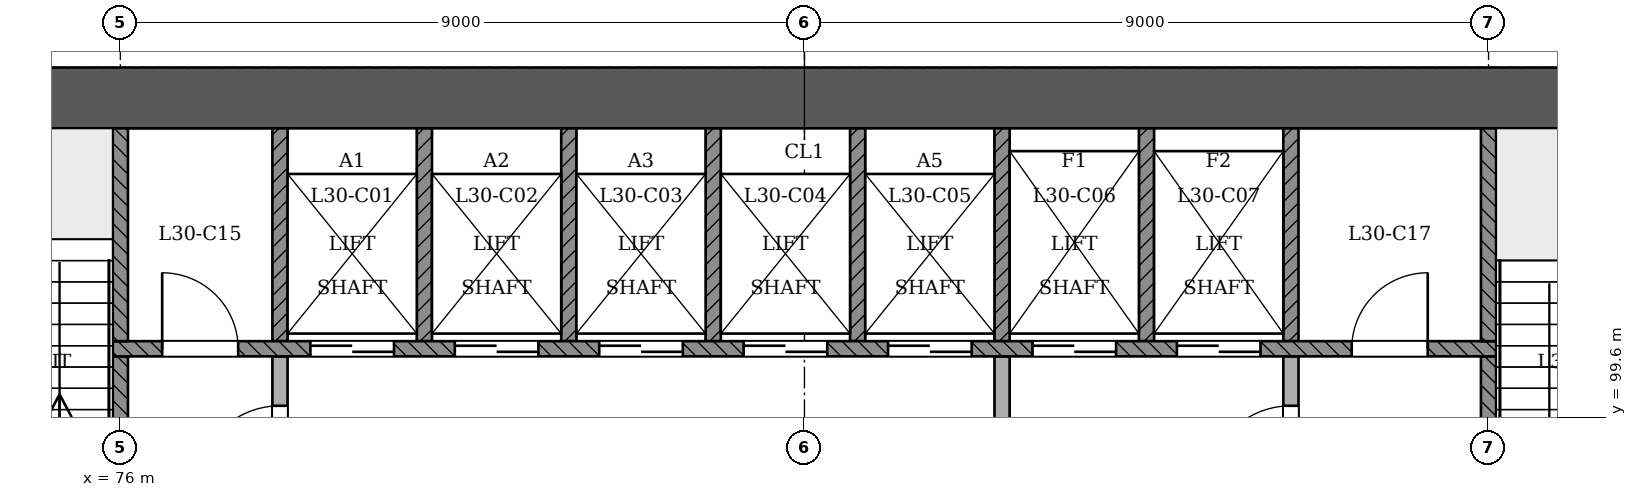
"""IFC4 building model, lengths in metres.
Left out: names, types, materials, properties, quantities, classifications, styles, units other than length and angle.
Written with IfcOpenShell. Run it as: python <this file> out.ifc"""

import sys

from ifc_helpers import new_model, si_unit, direction, frame, frame_2d, origin, place, context, subcontext, project, spatial, rectangle, extrude, element, fill, save


model = new_model("IFC4")
c1 = context("Model", 3, precision=1e-05, world=origin(), true_north=direction((0.0, 1.0)))
c2 = subcontext(c1, "Body", "Model", "MODEL_VIEW")
j1 = project(units=[si_unit("LENGTHUNIT", "METRE"), si_unit("PLANEANGLEUNIT", "RADIAN")], contexts=[c1])
p1 = place(None, origin())
s1 = spatial("IfcSite", under=j1, at=p1, CompositionType="ELEMENT")
p2 = place(p1, origin())
s2 = spatial("IfcBuilding", under=s1, at=p2, CompositionType="ELEMENT")
p3 = place(p2, frame((0.0, 0.0, 118.8)))
s3 = spatial("IfcBuildingStorey", under=s2, at=p3, CompositionType="ELEMENT", Elevation=118.8)
p4 = place(p3, frame((97.4, 103.8, 0.0), z_axis=(0.0, 0.0, 1.0), x_axis=(-1.0, 0.0, 0.0)))
e1 = element("IfcWall", 1, at=p4, inside=s3, PredefinedType="SHEAR", context=c2, shape_type="SweptSolid", body=[
    extrude(rectangle(XDim=25.2, YDim=0.8, at=frame_2d((12.6, 0.0))), origin(), (0.0, 0.0, 1.0), 5.4),
])
p5 = place(p3, frame((87.6, 93.4, 0.0), z_axis=(0.0, 0.0, 1.0), x_axis=(0.0, 1.0, 0.0)))
e2 = element("IfcWall", 2, at=p5, inside=s3, PredefinedType="PARTITIONING", context=c2, shape_type="SweptSolid", body=[
    extrude(rectangle(XDim=7.0, YDim=0.2, at=frame_2d((3.5, 0.0))), origin(), (0.0, 0.0, 1.0), 4.95),
])
p6 = place(p5, frame((4.45, 0.0, 0.0)))
e3 = element("IfcOpeningElement", 3, at=p6, cuts=e2, PredefinedType="OPENING", context=c2, shape_type="SweptSolid", body=[
    extrude(rectangle(XDim=1.1, YDim=2.1, at=frame_2d((0.55, 1.05))), frame((0.0, 0.11, 0.0), z_axis=(0.0, -1.0, 0.0), x_axis=(1.0, 0.0, 0.0)), (0.0, 0.0, 1.0), 0.221),
])
p7 = place(p3, frame((91.4, 96.2, 0.0), z_axis=(0.0, 0.0, 1.0), x_axis=(0.0, 1.0, 0.0)))
e4 = element("IfcWall", 4, at=p7, inside=s3, PredefinedType="PARTITIONING", context=c2, shape_type="SweptSolid", body=[
    extrude(rectangle(XDim=4.2, YDim=0.2, at=frame_2d((2.1, 0.0))), origin(), (0.0, 0.0, 1.0), 4.95),
])
p8 = place(p7, frame((2.45, 0.0, 0.0)))
e5 = element("IfcOpeningElement", 5, at=p8, cuts=e4, PredefinedType="OPENING", context=c2, shape_type="SweptSolid", body=[
    extrude(rectangle(XDim=1.1, YDim=2.1, at=frame_2d((0.55, 1.05))), frame((0.0, 0.11, 0.0), z_axis=(0.0, -1.0, 0.0), x_axis=(1.0, 0.0, 0.0)), (0.0, 0.0, 1.0), 0.221),
])
p9 = place(p3, frame((76.0, 96.7, 0.0), z_axis=(0.0, 0.0, 1.0), x_axis=(0.0, 1.0, 0.0)))
e6 = element("IfcWall", 6, at=p9, inside=s3, PredefinedType="SOLIDWALL", context=c2, shape_type="SweptSolid", body=[
    extrude(rectangle(XDim=3.7, YDim=0.2, at=frame_2d((1.85, 0.0))), origin(), (0.0, 0.0, 1.0), 4.95),
])
p10 = place(p9, frame((0.35, 0.0, 0.0)))
e7 = element("IfcOpeningElement", 7, at=p10, cuts=e6, PredefinedType="OPENING", context=c2, shape_type="SweptSolid", body=[
    extrude(rectangle(XDim=1.1, YDim=2.1, at=frame_2d((0.55, 1.05))), frame((0.0, 0.11, 0.0), z_axis=(0.0, -1.0, 0.0), x_axis=(1.0, 0.0, 0.0)), (0.0, 0.0, 1.0), 0.221),
])
p11 = place(p3, frame((78.1, 96.7, 0.0), z_axis=(0.0, 0.0, 1.0), x_axis=(0.0, 1.0, 0.0)))
e8 = element("IfcWall", 8, at=p11, inside=s3, PredefinedType="PARTITIONING", context=c2, shape_type="SweptSolid", body=[
    extrude(rectangle(XDim=3.7, YDim=0.2, at=frame_2d((1.85, 0.0))), origin(), (0.0, 0.0, 1.0), 4.95),
])
p12 = place(p11, frame((1.95, 0.0, 0.0)))
e9 = element("IfcOpeningElement", 9, at=p12, cuts=e8, PredefinedType="OPENING", context=c2, shape_type="SweptSolid", body=[
    extrude(rectangle(XDim=1.1, YDim=2.1, at=frame_2d((0.55, 1.05))), frame((0.0, 0.11, 0.0), z_axis=(0.0, -1.0, 0.0), x_axis=(1.0, 0.0, 0.0)), (0.0, 0.0, 1.0), 0.221),
])
p13 = place(p3, frame((94.0, 96.7, 0.0), z_axis=(0.0, 0.0, 1.0), x_axis=(0.0, 1.0, 0.0)))
e10 = element("IfcWall", 10, at=p13, inside=s3, PredefinedType="SOLIDWALL", context=c2, shape_type="SweptSolid", body=[
    extrude(rectangle(XDim=3.7, YDim=0.2, at=frame_2d((1.85, 0.0))), origin(), (0.0, 0.0, 1.0), 4.95),
])
p14 = place(p13, frame((0.35, 0.0, 0.0)))
e11 = element("IfcOpeningElement", 11, at=p14, cuts=e10, PredefinedType="OPENING", context=c2, shape_type="SweptSolid", body=[
    extrude(rectangle(XDim=1.1, YDim=2.1, at=frame_2d((0.55, 1.05))), frame((0.0, 0.11, 0.0), z_axis=(0.0, -1.0, 0.0), x_axis=(1.0, 0.0, 0.0)), (0.0, 0.0, 1.0), 0.221),
])
p15 = place(p3, frame((75.9, 100.5, 0.0), z_axis=(0.0, 0.0, 1.0), x_axis=(1.0, 0.0, 0.0)))
e12 = element("IfcWall", 12, at=p15, inside=s3, PredefinedType="SOLIDWALL", context=c2, shape_type="SweptSolid", body=[
    extrude(rectangle(XDim=18.2, YDim=0.2, at=frame_2d((9.1, 0.0))), origin(), (0.0, 0.0, 1.0), 4.95),
])
p16 = place(p15, frame((2.6, 0.0, 0.0)))
e13 = element("IfcOpeningElement", 13, at=p16, cuts=e12, PredefinedType="OPENING", context=c2, shape_type="SweptSolid", body=[
    extrude(rectangle(XDim=1.1, YDim=2.1, at=frame_2d((0.55, 1.05))), frame((0.0, 0.11, 0.0), z_axis=(0.0, -1.0, 0.0), x_axis=(1.0, 0.0, 0.0)), (0.0, 0.0, 1.0), 0.221),
])
p17 = place(p15, frame((4.5, 0.0, 0.0)))
e14 = element("IfcOpeningElement", 14, at=p17, cuts=e12, PredefinedType="OPENING", context=c2, shape_type="SweptSolid", body=[
    extrude(rectangle(XDim=1.1, YDim=2.1, at=frame_2d((0.55, 1.05))), frame((0.0, 0.11, 0.0), z_axis=(0.0, -1.0, 0.0), x_axis=(1.0, 0.0, 0.0)), (0.0, 0.0, 1.0), 0.221),
])
p18 = place(p15, frame((6.4, 0.0, 0.0)))
e15 = element("IfcOpeningElement", 15, at=p18, cuts=e12, PredefinedType="OPENING", context=c2, shape_type="SweptSolid", body=[
    extrude(rectangle(XDim=1.1, YDim=2.1, at=frame_2d((0.55, 1.05))), frame((0.0, 0.11, 0.0), z_axis=(0.0, -1.0, 0.0), x_axis=(1.0, 0.0, 0.0)), (0.0, 0.0, 1.0), 0.221),
])
p19 = place(p15, frame((8.3, 0.0, 0.0)))
e16 = element("IfcOpeningElement", 16, at=p19, cuts=e12, PredefinedType="OPENING", context=c2, shape_type="SweptSolid", body=[
    extrude(rectangle(XDim=1.1, YDim=2.1, at=frame_2d((0.55, 1.05))), frame((0.0, 0.11, 0.0), z_axis=(0.0, -1.0, 0.0), x_axis=(1.0, 0.0, 0.0)), (0.0, 0.0, 1.0), 0.221),
])
p20 = place(p15, frame((10.2, 0.0, 0.0)))
e17 = element("IfcOpeningElement", 17, at=p20, cuts=e12, PredefinedType="OPENING", context=c2, shape_type="SweptSolid", body=[
    extrude(rectangle(XDim=1.1, YDim=2.1, at=frame_2d((0.55, 1.05))), frame((0.0, 0.11, 0.0), z_axis=(0.0, -1.0, 0.0), x_axis=(1.0, 0.0, 0.0)), (0.0, 0.0, 1.0), 0.221),
])
p21 = place(p15, frame((12.1, 0.0, 0.0)))
e18 = element("IfcOpeningElement", 18, at=p21, cuts=e12, PredefinedType="OPENING", context=c2, shape_type="SweptSolid", body=[
    extrude(rectangle(XDim=1.1, YDim=2.1, at=frame_2d((0.55, 1.05))), frame((0.0, 0.11, 0.0), z_axis=(0.0, -1.0, 0.0), x_axis=(1.0, 0.0, 0.0)), (0.0, 0.0, 1.0), 0.221),
])
p22 = place(p15, frame((14.0, 0.0, 0.0)))
e19 = element("IfcOpeningElement", 19, at=p22, cuts=e12, PredefinedType="OPENING", context=c2, shape_type="SweptSolid", body=[
    extrude(rectangle(XDim=1.1, YDim=2.1, at=frame_2d((0.55, 1.05))), frame((0.0, 0.11, 0.0), z_axis=(0.0, -1.0, 0.0), x_axis=(1.0, 0.0, 0.0)), (0.0, 0.0, 1.0), 0.221),
])
p23 = place(p15, frame((0.65, 0.0, 0.0)))
e20 = element("IfcOpeningElement", 20, at=p23, cuts=e12, PredefinedType="OPENING", context=c2, shape_type="SweptSolid", body=[
    extrude(rectangle(XDim=1.0, YDim=2.1, at=frame_2d((0.5, 1.05))), frame((0.0, 0.11, 0.0), z_axis=(0.0, -1.0, 0.0), x_axis=(1.0, 0.0, 0.0)), (0.0, 0.0, 1.0), 0.221),
])
p24 = place(p15, frame((16.3, 0.0, 0.0)))
e21 = element("IfcOpeningElement", 21, at=p24, cuts=e12, PredefinedType="OPENING", context=c2, shape_type="SweptSolid", body=[
    extrude(rectangle(XDim=1.0, YDim=2.1, at=frame_2d((0.5, 1.05))), frame((0.0, 0.11, 0.0), z_axis=(0.0, -1.0, 0.0), x_axis=(1.0, 0.0, 0.0)), (0.0, 0.0, 1.0), 0.221),
])
for number, where, z_axis, x_axis in (
    (22, (76.0, 100.6, 0.0), (0.0, 0.0, 1.0), (0.0, 1.0, 0.0)),
    (23, (78.1, 100.6, 0.0), (0.0, 0.0, 1.0), (0.0, 1.0, 0.0)),
    (24, (80.0, 100.6, 0.0), (0.0, 0.0, 1.0), (0.0, 1.0, 0.0)),
    (25, (81.9, 100.6, 0.0), (0.0, 0.0, 1.0), (0.0, 1.0, 0.0)),
    (26, (83.8, 100.6, 0.0), (0.0, 0.0, 1.0), (0.0, 1.0, 0.0)),
    (27, (85.7, 100.6, 0.0), (0.0, 0.0, 1.0), (0.0, 1.0, 0.0)),
    (28, (87.6, 100.6, 0.0), (0.0, 0.0, 1.0), (0.0, 1.0, 0.0)),
    (29, (89.5, 100.6, 0.0), (0.0, 0.0, 1.0), (0.0, 1.0, 0.0)),
    (30, (91.4, 100.6, 0.0), (0.0, 0.0, 1.0), (0.0, 1.0, 0.0)),
    (31, (94.0, 100.6, 0.0), (0.0, 0.0, 1.0), (0.0, 1.0, 0.0)),
):
    element("IfcWall", number, at=place(p3, frame(where, z_axis=z_axis, x_axis=x_axis)), inside=s3, PredefinedType="SOLIDWALL", context=c2, shape_type="SweptSolid", body=[
        extrude(rectangle(XDim=2.8, YDim=0.2, at=frame_2d((1.4, 0.0))), origin(), (0.0, 0.0, 1.0), 4.95),
    ])
p25 = place(p16, origin())
e32 = element("IfcDoor", 32, at=p25, inside=s3, OperationType="SLIDING_TO_RIGHT", PredefinedType="NOTDEFINED", context=c2, shape_type="SweptSolid", body=[
    extrude(rectangle(XDim=1.1, YDim=2.1, at=frame_2d((0.55, 1.05))), frame((0.0, 0.025, 0.0), z_axis=(0.0, -1.0, 0.0), x_axis=(1.0, 0.0, 0.0)), (0.0, 0.0, 1.0), 0.05),
])
fill(e13, e32)
p26 = place(p17, origin())
e33 = element("IfcDoor", 33, at=p26, inside=s3, OperationType="SLIDING_TO_LEFT", PredefinedType="NOTDEFINED", context=c2, shape_type="SweptSolid", body=[
    extrude(rectangle(XDim=1.1, YDim=2.1, at=frame_2d((0.55, 1.05))), frame((0.0, 0.025, 0.0), z_axis=(0.0, -1.0, 0.0), x_axis=(1.0, 0.0, 0.0)), (0.0, 0.0, 1.0), 0.05),
])
fill(e14, e33)
p27 = place(p18, origin())
e34 = element("IfcDoor", 34, at=p27, inside=s3, OperationType="SLIDING_TO_RIGHT", PredefinedType="NOTDEFINED", context=c2, shape_type="SweptSolid", body=[
    extrude(rectangle(XDim=1.1, YDim=2.1, at=frame_2d((0.55, 1.05))), frame((0.0, 0.025, 0.0), z_axis=(0.0, -1.0, 0.0), x_axis=(1.0, 0.0, 0.0)), (0.0, 0.0, 1.0), 0.05),
])
fill(e15, e34)
p28 = place(p19, origin())
e35 = element("IfcDoor", 35, at=p28, inside=s3, OperationType="SLIDING_TO_LEFT", PredefinedType="NOTDEFINED", context=c2, shape_type="SweptSolid", body=[
    extrude(rectangle(XDim=1.1, YDim=2.1, at=frame_2d((0.55, 1.05))), frame((0.0, 0.025, 0.0), z_axis=(0.0, -1.0, 0.0), x_axis=(1.0, 0.0, 0.0)), (0.0, 0.0, 1.0), 0.05),
])
fill(e16, e35)
p29 = place(p20, origin())
e36 = element("IfcDoor", 36, at=p29, inside=s3, OperationType="SLIDING_TO_RIGHT", PredefinedType="NOTDEFINED", context=c2, shape_type="SweptSolid", body=[
    extrude(rectangle(XDim=1.1, YDim=2.1, at=frame_2d((0.55, 1.05))), frame((0.0, 0.025, 0.0), z_axis=(0.0, -1.0, 0.0), x_axis=(1.0, 0.0, 0.0)), (0.0, 0.0, 1.0), 0.05),
])
fill(e17, e36)
p30 = place(p21, origin())
e37 = element("IfcDoor", 37, at=p30, inside=s3, OperationType="SLIDING_TO_RIGHT", PredefinedType="NOTDEFINED", context=c2, shape_type="SweptSolid", body=[
    extrude(rectangle(XDim=1.1, YDim=2.1, at=frame_2d((0.55, 1.05))), frame((0.0, 0.025, 0.0), z_axis=(0.0, -1.0, 0.0), x_axis=(1.0, 0.0, 0.0)), (0.0, 0.0, 1.0), 0.05),
])
fill(e18, e37)
p31 = place(p22, origin())
e38 = element("IfcDoor", 38, at=p31, inside=s3, OperationType="SLIDING_TO_LEFT", PredefinedType="NOTDEFINED", context=c2, shape_type="SweptSolid", body=[
    extrude(rectangle(XDim=1.1, YDim=2.1, at=frame_2d((0.55, 1.05))), frame((0.0, 0.025, 0.0), z_axis=(0.0, -1.0, 0.0), x_axis=(1.0, 0.0, 0.0)), (0.0, 0.0, 1.0), 0.05),
])
fill(e19, e38)
p32 = place(p12, origin())
e39 = element("IfcDoor", 39, at=p32, inside=s3, OperationType="SINGLE_SWING_LEFT", PredefinedType="NOTDEFINED", context=c2, shape_type="SweptSolid", body=[
    extrude(rectangle(XDim=1.1, YDim=2.1, at=frame_2d((0.55, 1.05))), frame((0.0, 0.025, 0.0), z_axis=(0.0, -1.0, 0.0), x_axis=(1.0, 0.0, 0.0)), (0.0, 0.0, 1.0), 0.05),
])
fill(e9, e39)
p33 = place(p8, origin())
e40 = element("IfcDoor", 40, at=p33, inside=s3, OperationType="SINGLE_SWING_LEFT", PredefinedType="NOTDEFINED", context=c2, shape_type="SweptSolid", body=[
    extrude(rectangle(XDim=1.1, YDim=2.1, at=frame_2d((0.55, 1.05))), frame((0.0, 0.025, 0.0), z_axis=(0.0, -1.0, 0.0), x_axis=(1.0, 0.0, 0.0)), (0.0, 0.0, 1.0), 0.05),
])
fill(e5, e40)
p34 = place(p23, origin())
e41 = element("IfcDoor", 41, at=p34, inside=s3, OperationType="SINGLE_SWING_LEFT", PredefinedType="NOTDEFINED", context=c2, shape_type="SweptSolid", body=[
    extrude(rectangle(XDim=1.0, YDim=2.1, at=frame_2d((0.5, 1.05))), frame((0.0, 0.025, 0.0), z_axis=(0.0, -1.0, 0.0), x_axis=(1.0, 0.0, 0.0)), (0.0, 0.0, 1.0), 0.05),
])
fill(e20, e41)
p35 = place(p24, origin())
e42 = element("IfcDoor", 42, at=p35, inside=s3, OperationType="SINGLE_SWING_RIGHT", PredefinedType="NOTDEFINED", context=c2, shape_type="SweptSolid", body=[
    extrude(rectangle(XDim=1.0, YDim=2.1, at=frame_2d((0.5, 1.05))), frame((0.0, 0.025, 0.0), z_axis=(0.0, -1.0, 0.0), x_axis=(1.0, 0.0, 0.0)), (0.0, 0.0, 1.0), 0.05),
])
fill(e21, e42)
save(model, sys.argv[1])
